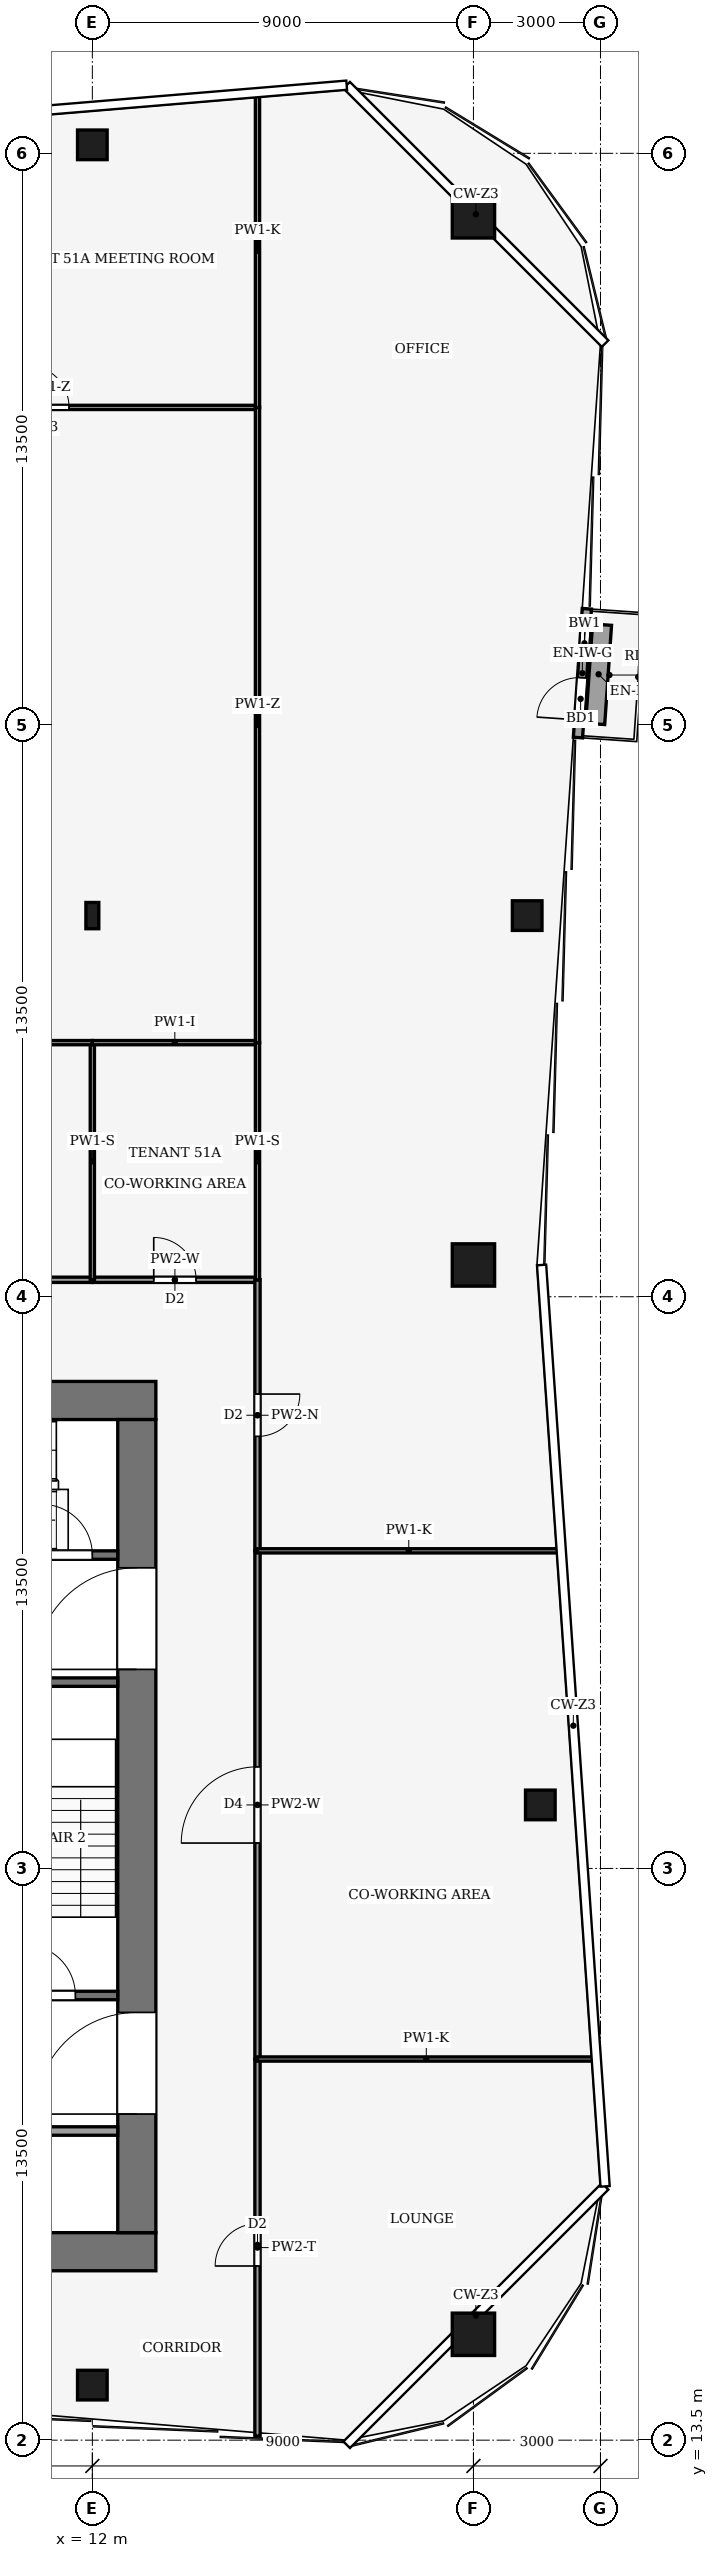
"""IFC4 building model, lengths in metres.
Left out: names, types, materials, properties, quantities, classifications, styles, units other than length and angle.
Written with IfcOpenShell. Run it as: python <this file> out.ifc"""

import sys

from ifc_helpers import new_model, si_unit, direction, frame, frame_2d, origin, origin_2d, place, context, subcontext, project, spatial, rectangle, hollow_rectangle, i_section, extrude, element, fill, save


model = new_model("IFC4")
c1 = context("Model", 3, precision=1e-05, world=origin(), true_north=direction((0.0, 1.0)))
c2 = subcontext(c1, "Body", "Model", "MODEL_VIEW")
j1 = project(units=[si_unit("LENGTHUNIT", "METRE"), si_unit("PLANEANGLEUNIT", "RADIAN")], contexts=[c1])
p1 = place(None, origin())
s1 = spatial("IfcSite", under=j1, at=p1, CompositionType="ELEMENT")
p2 = place(p1, origin())
s2 = spatial("IfcBuilding", under=s1, at=p2, CompositionType="ELEMENT")
p3 = place(p2, frame((0.0, 0.0, 222.0)))
s3 = spatial("IfcBuildingStorey", under=s2, at=p3, CompositionType="ELEMENT", Elevation=222.0)
for number, where, z_axis, x_axis in (
    (1, (-13.5, 17.95, -0.13), (0.0, 0.0, 1.0), (1.0, 0.0, 0.0)),
    (2, (-13.5, 38.05, -0.13), (0.0, 0.0, 1.0), (1.0, 0.0, 0.0)),
):
    element("IfcWall", number, at=place(p3, frame(where, z_axis=z_axis, x_axis=x_axis)), inside=s3, PredefinedType="SHEAR", context=c2, shape_type="SweptSolid", body=[
        extrude(rectangle(XDim=27.0, YDim=0.9, at=frame_2d((13.5, 0.0))), origin(), (0.0, 0.0, 1.0), 3.88),
    ])
p4 = place(p3, frame((13.05, 18.4, -0.13), z_axis=(0.0, 0.0, 1.0), x_axis=(0.0, 1.0, 0.0)))
e3 = element("IfcWall", 3, at=p4, inside=s3, PredefinedType="SHEAR", context=c2, shape_type="SweptSolid", body=[
    extrude(rectangle(XDim=19.2, YDim=0.9, at=frame_2d((9.6, 0.0))), origin(), (0.0, 0.0, 1.0), 3.88),
])
p5 = place(p4, frame((2.8, 0.0, 0.13)))
e4 = element("IfcOpeningElement", 4, at=p5, cuts=e3, PredefinedType="OPENING", context=c2, shape_type="SweptSolid", body=[
    extrude(rectangle(XDim=2.4, YDim=2.4, at=frame_2d((1.2, 1.2))), frame((0.0, 0.46, 0.0), z_axis=(0.0, -1.0, 0.0), x_axis=(1.0, 0.0, 0.0)), (0.0, 0.0, 1.0), 0.92),
])
p6 = place(p4, frame((13.3, 0.0, 0.13)))
e5 = element("IfcOpeningElement", 5, at=p6, cuts=e3, PredefinedType="OPENING", context=c2, shape_type="SweptSolid", body=[
    extrude(rectangle(XDim=2.4, YDim=2.4, at=frame_2d((1.2, 1.2))), frame((0.0, 0.46, 0.0), z_axis=(0.0, -1.0, 0.0), x_axis=(1.0, 0.0, 0.0)), (0.0, 0.0, 1.0), 0.92),
])
for number, where, z_axis, x_axis in (
    (6, (21.0, 66.0, 0.0), (0.0, 0.0, 1.0), (1.0, 0.0, 0.0)),
    (7, (21.0, 41.25, 0.0), (0.0, 0.0, 1.0), (1.0, 0.0, 0.0)),
    (8, (21.0, 16.0, 0.0), (0.0, 0.0, 1.0), (1.0, 0.0, 0.0)),
):
    element("IfcColumn", number, at=place(p3, frame(where, z_axis=z_axis, x_axis=x_axis)), inside=s3, PredefinedType="COLUMN", context=c2, shape_type="SweptSolid", body=[
        extrude(hollow_rectangle(XDim=1.0, YDim=1.0, WallThickness=0.06, at=origin_2d()), origin(), (0.0, 0.0, 1.0), 4.0),
    ])
for number, where, z_axis, x_axis in (
    (9, (12.0, 67.7, 0.0), (0.0, 0.0, 1.0), (1.0, 0.0, 0.0)),
    (10, (12.0, 14.8, 0.0), (0.0, 0.0, 1.0), (1.0, 0.0, 0.0)),
    (11, (22.579, 28.5, 0.0), (0.0, 0.0, 1.0), (1.0, 0.0, 0.0)),
    (12, (22.269, 49.5, 0.0), (0.0, 0.0, 1.0), (1.0, 0.0, 0.0)),
):
    element("IfcColumn", number, at=place(p3, frame(where, z_axis=z_axis, x_axis=x_axis)), inside=s3, PredefinedType="COLUMN", context=c2, shape_type="SweptSolid", body=[
        extrude(hollow_rectangle(XDim=0.7, YDim=0.7, WallThickness=0.03, at=origin_2d()), origin(), (0.0, 0.0, 1.0), 4.0),
    ])
p7 = place(p3, frame((12.0, 49.5, 0.0), z_axis=(0.0, 0.0, 1.0), x_axis=(1.0, 0.0, 0.0)))
e13 = element("IfcColumn", 13, at=p7, inside=s3, PredefinedType="COLUMN", context=c2, shape_type="SweptSolid", body=[
    extrude(i_section(OverallWidth=0.305, OverallDepth=0.62, WebThickness=0.021, FlangeThickness=0.04, FilletRadius=0.027, at=origin_2d()), origin(), (0.0, 0.0, 1.0), 4.0),
])
p8 = place(p3, frame((23.468, 53.704, 0.0), z_axis=(0.0, 0.0, 1.0), x_axis=(0.068793846076, 0.997630897047, 0.0)))
e14 = element("IfcWall", 14, at=p8, inside=s3, PredefinedType="SOLIDWALL", context=c2, shape_type="SweptSolid", body=[
    extrude(rectangle(XDim=3.049, YDim=0.218, at=frame_2d((1.524, 0.0))), origin(), (0.0, 0.0, 1.0), 3.65),
])
p9 = place(p8, frame((0.416, 0.0, 0.0)))
e15 = element("IfcOpeningElement", 15, at=p9, cuts=e14, PredefinedType="OPENING", context=c2, shape_type="SweptSolid", body=[
    extrude(rectangle(XDim=1.0, YDim=2.1, at=frame_2d((0.5, 1.05))), frame((0.0, 0.119, 0.0), z_axis=(0.0, -1.0, 0.0), x_axis=(1.0, 0.0, 0.0)), (0.0, 0.0, 1.0), 0.238),
])
p10 = place(p8, frame((1.832, 0.0, 0.9)))
e16 = element("IfcOpeningElement", 16, at=p10, cuts=e14, PredefinedType="OPENING", context=c2, shape_type="SweptSolid", body=[
    extrude(rectangle(XDim=0.8, YDim=1.2, at=frame_2d((0.4, 0.6))), frame((0.0, 0.119, 0.0), z_axis=(0.0, -1.0, 0.0), x_axis=(1.0, 0.0, 0.0)), (0.0, 0.0, 1.0), 0.238),
])
p11 = place(p3, frame((23.875, 54.027, 0.0), z_axis=(0.0, 0.0, 1.0), x_axis=(0.068823499363, 0.997628851796, 0.0)))
e17 = element("IfcWall", 17, at=p11, inside=s3, PredefinedType="USERDEFINED", context=c2, shape_type="SweptSolid", body=[
    extrude(rectangle(XDim=2.348, YDim=0.45, at=frame_2d((1.174, 0.0))), origin(), (0.0, 0.0, 1.0), 0.4),
])
p12 = place(p3, frame((6.0, 20.8, 0.0), z_axis=(0.0, 0.0, 1.0), x_axis=(1.0, 0.0, 0.0)))
e18 = element("IfcWall", 18, at=p12, inside=s3, PredefinedType="PARTITIONING", context=c2, shape_type="SweptSolid", body=[
    extrude(rectangle(XDim=6.6, YDim=0.2, at=frame_2d((3.3, 0.0))), origin(), (0.0, 0.0, 1.0), 3.75),
])
p13 = place(p12, frame((2.8, 0.0, 0.0)))
e19 = element("IfcOpeningElement", 19, at=p13, cuts=e18, PredefinedType="OPENING", context=c2, shape_type="SweptSolid", body=[
    extrude(rectangle(XDim=1.0, YDim=2.1, at=frame_2d((0.5, 1.05))), frame((0.0, 0.11, 0.0), z_axis=(0.0, -1.0, 0.0), x_axis=(1.0, 0.0, 0.0)), (0.0, 0.0, 1.0), 0.22),
])
p14 = place(p3, frame((6.0, 24.0, 0.0), z_axis=(0.0, 0.0, 1.0), x_axis=(1.0, 0.0, 0.0)))
e20 = element("IfcWall", 20, at=p14, inside=s3, PredefinedType="PARTITIONING", context=c2, shape_type="SweptSolid", body=[
    extrude(rectangle(XDim=6.6, YDim=0.2, at=frame_2d((3.3, 0.0))), origin(), (0.0, 0.0, 1.0), 3.75),
])
p15 = place(p14, frame((0.3, 0.0, 0.0)))
e21 = element("IfcOpeningElement", 21, at=p15, cuts=e20, PredefinedType="OPENING", context=c2, shape_type="SweptSolid", body=[
    extrude(rectangle(XDim=0.8, YDim=2.1, at=frame_2d((0.4, 1.05))), frame((0.0, 0.11, 0.0), z_axis=(0.0, -1.0, 0.0), x_axis=(1.0, 0.0, 0.0)), (0.0, 0.0, 1.0), 0.22),
])
p16 = place(p14, frame((1.7, 0.0, 0.0)))
e22 = element("IfcOpeningElement", 22, at=p16, cuts=e20, PredefinedType="OPENING", context=c2, shape_type="SweptSolid", body=[
    extrude(rectangle(XDim=0.8, YDim=2.1, at=frame_2d((0.4, 1.05))), frame((0.0, 0.11, 0.0), z_axis=(0.0, -1.0, 0.0), x_axis=(1.0, 0.0, 0.0)), (0.0, 0.0, 1.0), 0.22),
])
p17 = place(p14, frame((4.4, 0.0, 0.0)))
e23 = element("IfcOpeningElement", 23, at=p17, cuts=e20, PredefinedType="OPENING", context=c2, shape_type="SweptSolid", body=[
    extrude(rectangle(XDim=1.2, YDim=2.2, at=frame_2d((0.6, 1.1))), frame((0.0, 0.11, 0.0), z_axis=(0.0, -1.0, 0.0), x_axis=(1.0, 0.0, 0.0)), (0.0, 0.0, 1.0), 0.22),
])
p18 = place(p3, frame((6.0, 31.4, 0.0), z_axis=(0.0, 0.0, 1.0), x_axis=(1.0, 0.0, 0.0)))
e24 = element("IfcWall", 24, at=p18, inside=s3, PredefinedType="PARTITIONING", context=c2, shape_type="SweptSolid", body=[
    extrude(rectangle(XDim=6.6, YDim=0.2, at=frame_2d((3.3, 0.0))), origin(), (0.0, 0.0, 1.0), 3.75),
])
p19 = place(p3, frame((6.0, 34.4, 0.0), z_axis=(0.0, 0.0, 1.0), x_axis=(1.0, 0.0, 0.0)))
e25 = element("IfcWall", 25, at=p19, inside=s3, PredefinedType="PARTITIONING", context=c2, shape_type="SweptSolid", body=[
    extrude(rectangle(XDim=6.6, YDim=0.2, at=frame_2d((3.3, 0.0))), origin(), (0.0, 0.0, 1.0), 3.75),
])
p20 = place(p19, frame((4.8, 0.0, 0.0)))
e26 = element("IfcOpeningElement", 26, at=p20, cuts=e25, PredefinedType="OPENING", context=c2, shape_type="SweptSolid", body=[
    extrude(rectangle(XDim=1.2, YDim=2.2, at=frame_2d((0.6, 1.1))), frame((0.0, 0.11, 0.0), z_axis=(0.0, -1.0, 0.0), x_axis=(1.0, 0.0, 0.0)), (0.0, 0.0, 1.0), 0.22),
])
p21 = place(p3, frame((12.0, 40.9, 0.0), z_axis=(0.0, 0.0, 1.0), x_axis=(-1.0, 0.0, 0.0)))
e27 = element("IfcWall", 27, at=p21, inside=s3, PredefinedType="PARTITIONING", context=c2, shape_type="SweptSolid", body=[
    extrude(rectangle(XDim=15.0, YDim=0.125, at=frame_2d((7.5, 0.0))), origin(), (0.0, 0.0, 1.0), 3.32),
])
p22 = place(p21, frame((6.6, 0.0, 0.0)))
e28 = element("IfcOpeningElement", 28, at=p22, cuts=e27, PredefinedType="OPENING", context=c2, shape_type="SweptSolid", body=[
    extrude(rectangle(XDim=1.8, YDim=2.1, at=frame_2d((0.9, 1.05))), frame((0.0, 0.073, 0.0), z_axis=(0.0, -1.0, 0.0), x_axis=(1.0, 0.0, 0.0)), (0.0, 0.0, 1.0), 0.145),
])
p23 = place(p3, frame((12.0, 40.9, 0.0), z_axis=(0.0, 0.0, 1.0), x_axis=(1.0, 0.0, 0.0)))
e29 = element("IfcWall", 29, at=p23, inside=s3, PredefinedType="PARTITIONING", context=c2, shape_type="SweptSolid", body=[
    extrude(rectangle(XDim=3.9, YDim=0.125, at=frame_2d((1.95, 0.0))), origin(), (0.0, 0.0, 1.0), 3.32),
])
p24 = place(p23, frame((1.45, 0.0, 0.0)))
e30 = element("IfcOpeningElement", 30, at=p24, cuts=e29, PredefinedType="OPENING", context=c2, shape_type="SweptSolid", body=[
    extrude(rectangle(XDim=1.0, YDim=2.1, at=frame_2d((0.5, 1.05))), frame((0.0, 0.073, 0.0), z_axis=(0.0, -1.0, 0.0), x_axis=(1.0, 0.0, 0.0)), (0.0, 0.0, 1.0), 0.145),
])
p25 = place(p3, frame((15.9, 13.595, 0.0), z_axis=(0.0, 0.0, 1.0), x_axis=(0.0, 1.0, 0.0)))
e31 = element("IfcWall", 31, at=p25, inside=s3, PredefinedType="PARTITIONING", context=c2, shape_type="SweptSolid", body=[
    extrude(rectangle(XDim=8.905, YDim=0.125, at=frame_2d((4.453, 0.0))), origin(), (0.0, 0.0, 1.0), 2.92),
])
p26 = place(p25, frame((4.018, 0.0, 0.0)))
e32 = element("IfcOpeningElement", 32, at=p26, cuts=e31, PredefinedType="OPENING", context=c2, shape_type="SweptSolid", body=[
    extrude(rectangle(XDim=1.0, YDim=2.1, at=frame_2d((0.5, 1.05))), frame((0.0, 0.073, 0.0), z_axis=(0.0, -1.0, 0.0), x_axis=(1.0, 0.0, 0.0)), (0.0, 0.0, 1.0), 0.145),
])
p27 = place(p3, frame((15.9, 22.5, 0.0), z_axis=(0.0, 0.0, 1.0), x_axis=(0.0, 1.0, 0.0)))
e33 = element("IfcWall", 33, at=p27, inside=s3, PredefinedType="PARTITIONING", context=c2, shape_type="SweptSolid", body=[
    extrude(rectangle(XDim=12.0, YDim=0.125, at=frame_2d((6.0, 0.0))), origin(), (0.0, 0.0, 1.0), 3.32),
])
p28 = place(p27, frame((5.1, 0.0, 0.0)))
e34 = element("IfcOpeningElement", 34, at=p28, cuts=e33, PredefinedType="OPENING", context=c2, shape_type="SweptSolid", body=[
    extrude(rectangle(XDim=1.8, YDim=2.1, at=frame_2d((0.9, 1.05))), frame((0.0, 0.073, 0.0), z_axis=(0.0, -1.0, 0.0), x_axis=(1.0, 0.0, 0.0)), (0.0, 0.0, 1.0), 0.145),
])
p29 = place(p3, frame((15.9, 40.904, 0.0), z_axis=(0.0, 0.0, 1.0), x_axis=(0.0, -1.0, 0.0)))
e35 = element("IfcWall", 35, at=p29, inside=s3, PredefinedType="PARTITIONING", context=c2, shape_type="SweptSolid", body=[
    extrude(rectangle(XDim=6.404, YDim=0.125, at=frame_2d((3.202, 0.0))), origin(), (0.0, 0.0, 1.0), 3.02),
])
p30 = place(p29, frame((2.702, 0.0, 0.0)))
e36 = element("IfcOpeningElement", 36, at=p30, cuts=e35, PredefinedType="OPENING", context=c2, shape_type="SweptSolid", body=[
    extrude(rectangle(XDim=1.0, YDim=2.1, at=frame_2d((0.5, 1.05))), frame((0.0, 0.073, 0.0), z_axis=(0.0, -1.0, 0.0), x_axis=(1.0, 0.0, 0.0)), (0.0, 0.0, 1.0), 0.145),
])
p31 = place(p3, frame((12.0, 40.9, 0.0), z_axis=(0.0, 0.0, 1.0), x_axis=(0.0, 1.0, 0.0)))
e37 = element("IfcWall", 37, at=p31, inside=s3, PredefinedType="PARTITIONING", context=c2, shape_type="SweptSolid", body=[
    extrude(rectangle(XDim=5.6, YDim=0.1, at=frame_2d((2.8, 0.0))), origin(), (0.0, 0.0, 1.0), 3.32),
])
p32 = place(p3, frame((-3.004, 46.5, 0.0), z_axis=(0.0, 0.0, 1.0), x_axis=(1.0, 0.0, 0.0)))
e38 = element("IfcWall", 38, at=p32, inside=s3, PredefinedType="PARTITIONING", context=c2, shape_type="SweptSolid", body=[
    extrude(rectangle(XDim=15.008, YDim=0.1, at=frame_2d((7.504, 0.0))), origin(), (0.0, 0.0, 1.0), 3.32),
])
p33 = place(p32, frame((6.604, 0.0, 0.0)))
e39 = element("IfcOpeningElement", 39, at=p33, cuts=e38, PredefinedType="OPENING", context=c2, shape_type="SweptSolid", body=[
    extrude(rectangle(XDim=1.8, YDim=2.1, at=frame_2d((0.9, 1.05))), frame((0.0, 0.06, 0.0), z_axis=(0.0, -1.0, 0.0), x_axis=(1.0, 0.0, 0.0)), (0.0, 0.0, 1.0), 0.12),
])
p34 = place(p3, frame((15.9, 46.5, 0.0), z_axis=(0.0, 0.0, 1.0), x_axis=(-1.0, 0.0, 0.0)))
e40 = element("IfcWall", 40, at=p34, inside=s3, PredefinedType="PARTITIONING", context=c2, shape_type="SweptSolid", body=[
    extrude(rectangle(XDim=3.904, YDim=0.1, at=frame_2d((1.952, 0.0))), origin(), (0.0, 0.0, 1.0), 3.75),
])
p35 = place(p3, frame((15.9, 40.896, 0.0), z_axis=(0.0, 0.0, 1.0), x_axis=(0.0, 1.0, 0.0)))
e41 = element("IfcWall", 41, at=p35, inside=s3, PredefinedType="PARTITIONING", context=c2, shape_type="SweptSolid", body=[
    extrude(rectangle(XDim=5.608, YDim=0.1, at=frame_2d((2.804, 0.0))), origin(), (0.0, 0.0, 1.0), 3.32),
])
p36 = place(p3, frame((6.0, 61.5, 0.0), z_axis=(0.0, 0.0, 1.0), x_axis=(1.0, 0.0, 0.0)))
e42 = element("IfcWall", 42, at=p36, inside=s3, PredefinedType="PARTITIONING", context=c2, shape_type="SweptSolid", body=[
    extrude(rectangle(XDim=9.9, YDim=0.1, at=frame_2d((4.95, 0.0))), origin(), (0.0, 0.0, 1.0), 3.12),
])
p37 = place(p36, frame((4.45, 0.0, 0.0)))
e43 = element("IfcOpeningElement", 43, at=p37, cuts=e42, PredefinedType="OPENING", context=c2, shape_type="SweptSolid", body=[
    extrude(rectangle(XDim=1.0, YDim=2.1, at=frame_2d((0.5, 1.05))), frame((0.0, 0.06, 0.0), z_axis=(0.0, -1.0, 0.0), x_axis=(1.0, 0.0, 0.0)), (0.0, 0.0, 1.0), 0.12),
])
p38 = place(p3, frame((15.9, 46.496, 0.0), z_axis=(0.0, 0.0, 1.0), x_axis=(0.0, 1.0, 0.0)))
e44 = element("IfcWall", 44, at=p38, inside=s3, PredefinedType="PARTITIONING", context=c2, shape_type="SweptSolid", body=[
    extrude(rectangle(XDim=15.008, YDim=0.1, at=frame_2d((7.504, 0.0))), origin(), (0.0, 0.0, 1.0), 3.12),
])
p39 = place(p3, frame((15.9, 61.496, 0.0), z_axis=(0.0, 0.0, 1.0), x_axis=(0.0, 1.0, 0.0)))
e45 = element("IfcWall", 45, at=p39, inside=s3, PredefinedType="PARTITIONING", context=c2, shape_type="SweptSolid", body=[
    extrude(rectangle(XDim=7.409, YDim=0.1, at=frame_2d((3.705, 0.0))), origin(), (0.0, 0.0, 1.0), 2.92),
])
p40 = place(p3, frame((23.873, 22.5, 0.0), z_axis=(0.0, 0.0, 1.0), x_axis=(-1.0, 0.0, 0.0)))
e46 = element("IfcWall", 46, at=p40, inside=s3, PredefinedType="PARTITIONING", context=c2, shape_type="SweptSolid", body=[
    extrude(rectangle(XDim=7.973, YDim=0.1, at=frame_2d((3.987, 0.0))), origin(), (0.0, 0.0, 1.0), 2.92),
])
p41 = place(p3, frame((23.045, 34.5, 0.0), z_axis=(0.0, 0.0, 1.0), x_axis=(-1.0, 0.0, 0.0)))
e47 = element("IfcWall", 47, at=p41, inside=s3, PredefinedType="PARTITIONING", context=c2, shape_type="SweptSolid", body=[
    extrude(rectangle(XDim=7.146, YDim=0.1, at=frame_2d((3.573, 0.0))), origin(), (0.0, 0.0, 1.0), 2.92),
])
p42 = place(p9, origin())
e48 = element("IfcDoor", 48, at=p42, inside=s3, OperationType="SINGLE_SWING_LEFT", PredefinedType="DOOR", context=c2, shape_type="SweptSolid", body=[
    extrude(rectangle(XDim=1.0, YDim=2.1, at=frame_2d((0.5, 1.05))), frame((0.0, 0.025, 0.0), z_axis=(0.0, -1.0, 0.0), x_axis=(1.0, 0.0, 0.0)), (0.0, 0.0, 1.0), 0.05),
])
fill(e15, e48)
p43 = place(p10, origin())
e49 = element("IfcWindow", 49, at=p43, inside=s3, PartitioningType="SINGLE_PANEL", PredefinedType="WINDOW", context=c2, shape_type="SweptSolid", body=[
    extrude(rectangle(XDim=0.8, YDim=1.2, at=frame_2d((0.4, 0.6))), frame((0.0, 0.03, 0.0), z_axis=(0.0, -1.0, 0.0), x_axis=(1.0, 0.0, 0.0)), (0.0, 0.0, 1.0), 0.06),
])
fill(e16, e49)
p44 = place(p17, origin())
e50 = element("IfcDoor", 50, at=p44, inside=s3, OperationType="SINGLE_SWING_LEFT", PredefinedType="DOOR", context=c2, shape_type="SweptSolid", body=[
    extrude(rectangle(XDim=1.2, YDim=2.2, at=frame_2d((0.6, 1.1))), frame((0.0, 0.025, 0.0), z_axis=(0.0, -1.0, 0.0), x_axis=(1.0, 0.0, 0.0)), (0.0, 0.0, 1.0), 0.05),
])
fill(e23, e50)
p45 = place(p20, origin())
e51 = element("IfcDoor", 51, at=p45, inside=s3, OperationType="SINGLE_SWING_RIGHT", PredefinedType="DOOR", context=c2, shape_type="SweptSolid", body=[
    extrude(rectangle(XDim=1.2, YDim=2.2, at=frame_2d((0.6, 1.1))), frame((0.0, 0.025, 0.0), z_axis=(0.0, -1.0, 0.0), x_axis=(1.0, 0.0, 0.0)), (0.0, 0.0, 1.0), 0.05),
])
fill(e26, e51)
p46 = place(p5, origin())
e52 = element("IfcDoor", 52, at=p46, inside=s3, OperationType="DOUBLE_DOOR_SINGLE_SWING", PredefinedType="DOOR", context=c2, shape_type="SweptSolid", body=[
    extrude(rectangle(XDim=2.4, YDim=2.4, at=frame_2d((1.2, 1.2))), frame((0.0, 0.025, 0.0), z_axis=(0.0, -1.0, 0.0), x_axis=(1.0, 0.0, 0.0)), (0.0, 0.0, 1.0), 0.05),
])
fill(e4, e52)
p47 = place(p6, origin())
e53 = element("IfcDoor", 53, at=p47, inside=s3, OperationType="DOUBLE_DOOR_SINGLE_SWING", PredefinedType="DOOR", context=c2, shape_type="SweptSolid", body=[
    extrude(rectangle(XDim=2.4, YDim=2.4, at=frame_2d((1.2, 1.2))), frame((0.0, 0.025, 0.0), z_axis=(0.0, -1.0, 0.0), x_axis=(1.0, 0.0, 0.0)), (0.0, 0.0, 1.0), 0.05),
])
fill(e5, e53)
p48 = place(p24, origin())
e54 = element("IfcDoor", 54, at=p48, inside=s3, OperationType="SINGLE_SWING_LEFT", PredefinedType="DOOR", context=c2, shape_type="SweptSolid", body=[
    extrude(rectangle(XDim=1.0, YDim=2.1, at=frame_2d((0.5, 1.05))), frame((0.0, 0.025, 0.0), z_axis=(0.0, -1.0, 0.0), x_axis=(1.0, 0.0, 0.0)), (0.0, 0.0, 1.0), 0.05),
])
fill(e30, e54)
p49 = place(p26, origin())
e55 = element("IfcDoor", 55, at=p49, inside=s3, OperationType="SINGLE_SWING_RIGHT", PredefinedType="DOOR", context=c2, shape_type="SweptSolid", body=[
    extrude(rectangle(XDim=1.0, YDim=2.1, at=frame_2d((0.5, 1.05))), frame((0.0, 0.025, 0.0), z_axis=(0.0, -1.0, 0.0), x_axis=(1.0, 0.0, 0.0)), (0.0, 0.0, 1.0), 0.05),
])
fill(e32, e55)
p50 = place(p28, origin())
e56 = element("IfcDoor", 56, at=p50, inside=s3, OperationType="DOUBLE_DOOR_SINGLE_SWING", PredefinedType="DOOR", context=c2, shape_type="SweptSolid", body=[
    extrude(rectangle(XDim=1.8, YDim=2.1, at=frame_2d((0.9, 1.05))), frame((0.0, 0.025, 0.0), z_axis=(0.0, -1.0, 0.0), x_axis=(1.0, 0.0, 0.0)), (0.0, 0.0, 1.0), 0.05),
])
fill(e34, e56)
p51 = place(p30, origin())
e57 = element("IfcDoor", 57, at=p51, inside=s3, OperationType="SINGLE_SWING_RIGHT", PredefinedType="DOOR", context=c2, shape_type="SweptSolid", body=[
    extrude(rectangle(XDim=1.0, YDim=2.1, at=frame_2d((0.5, 1.05))), frame((0.0, 0.025, 0.0), z_axis=(0.0, -1.0, 0.0), x_axis=(1.0, 0.0, 0.0)), (0.0, 0.0, 1.0), 0.05),
])
fill(e36, e57)
p52 = place(p37, origin())
e58 = element("IfcDoor", 58, at=p52, inside=s3, OperationType="SINGLE_SWING_LEFT", PredefinedType="DOOR", context=c2, shape_type="SweptSolid", body=[
    extrude(rectangle(XDim=1.0, YDim=2.1, at=frame_2d((0.5, 1.05))), frame((0.0, 0.025, 0.0), z_axis=(0.0, -1.0, 0.0), x_axis=(1.0, 0.0, 0.0)), (0.0, 0.0, 1.0), 0.05),
])
fill(e43, e58)
save(model, sys.argv[1])
